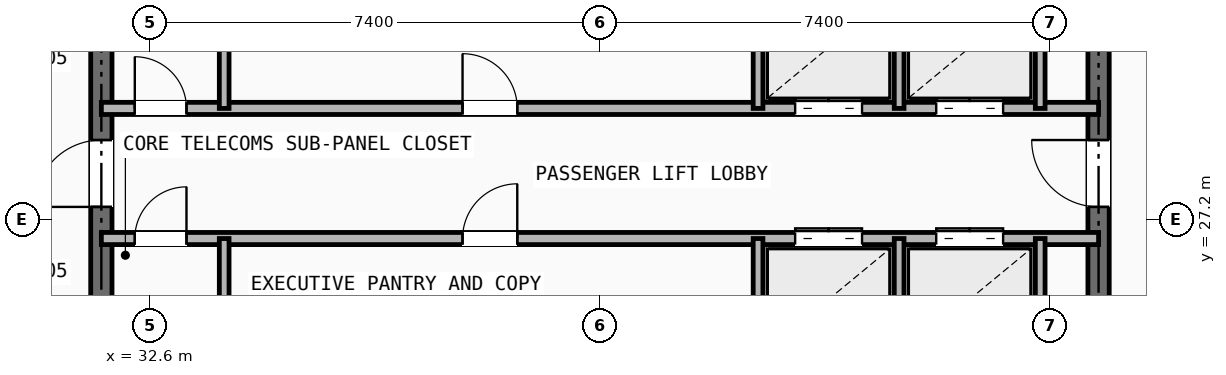
"""IFC4 building model, lengths in metres.
Left out: names, types, materials, properties, quantities, classifications, styles, units other than length and angle.
Written with IfcOpenShell. Run it as: python <this file> out.ifc"""

import sys

from ifc_helpers import new_model, si_unit, direction, frame, frame_2d, origin, place, context, subcontext, project, spatial, rectangle, extrude, element, fill, save


model = new_model("IFC4")
c1 = context("Model", 3, precision=1e-05, world=origin(), true_north=direction((0.0, 1.0)))
c2 = subcontext(c1, "Body", "Model", "MODEL_VIEW")
j1 = project(units=[si_unit("LENGTHUNIT", "METRE"), si_unit("PLANEANGLEUNIT", "RADIAN")], contexts=[c1])
p1 = place(None, origin())
s1 = spatial("IfcSite", under=j1, at=p1, CompositionType="ELEMENT")
p2 = place(p1, origin())
s2 = spatial("IfcBuilding", under=s1, at=p2, CompositionType="ELEMENT")
p3 = place(p2, frame((0.0, 0.0, 262.0)))
s3 = spatial("IfcBuildingStorey", under=s2, at=p3, CompositionType="ELEMENT", Elevation=262.0)
p4 = place(p3, frame((31.8, 16.4, 0.0), z_axis=(0.0, 0.0, 1.0), x_axis=(0.0, 1.0, 0.0)))
e1 = element("IfcWall", 1, at=p4, inside=s3, PredefinedType="SHEAR", context=c2, shape_type="SweptSolid", body=[
    extrude(rectangle(XDim=14.8, YDim=0.35, at=frame_2d((7.4, 0.0))), origin(), (0.0, 0.0, 1.0), 3.25),
])
p5 = place(p4, frame((11.0, 0.0, 0.0)))
e2 = element("IfcOpeningElement", 2, at=p5, cuts=e1, PredefinedType="OPENING", context=c2, shape_type="SweptSolid", body=[
    extrude(rectangle(XDim=1.1, YDim=2.15, at=frame_2d((0.55, 1.075))), frame((0.0, 0.185, 0.0), z_axis=(0.0, -1.0, 0.0), x_axis=(1.0, 0.0, 0.0)), (0.0, 0.0, 1.0), 0.37),
])
p6 = place(p3, frame((48.2, 16.4, 0.0), z_axis=(0.0, 0.0, 1.0), x_axis=(0.0, 1.0, 0.0)))
e3 = element("IfcWall", 3, at=p6, inside=s3, PredefinedType="SHEAR", context=c2, shape_type="SweptSolid", body=[
    extrude(rectangle(XDim=14.8, YDim=0.35, at=frame_2d((7.4, 0.0))), origin(), (0.0, 0.0, 1.0), 3.25),
])
p7 = place(p6, frame((11.0, 0.0, 0.0)))
e4 = element("IfcOpeningElement", 4, at=p7, cuts=e3, PredefinedType="OPENING", context=c2, shape_type="SweptSolid", body=[
    extrude(rectangle(XDim=1.1, YDim=2.15, at=frame_2d((0.55, 1.075))), frame((0.0, 0.185, 0.0), z_axis=(0.0, -1.0, 0.0), x_axis=(1.0, 0.0, 0.0)), (0.0, 0.0, 1.0), 0.37),
])
p8 = place(p3, frame((31.8, 29.02, 0.0), z_axis=(0.0, 0.0, 1.0), x_axis=(1.0, 0.0, 0.0)))
e5 = element("IfcWall", 5, at=p8, inside=s3, PredefinedType="SOLIDWALL", context=c2, shape_type="SweptSolid", body=[
    extrude(rectangle(XDim=16.4, YDim=0.2, at=frame_2d((8.2, 0.0))), origin(), (0.0, 0.0, 1.0), 2.705),
])
p9 = place(p8, frame((0.55, 0.0, 0.0)))
e6 = element("IfcOpeningElement", 6, at=p9, cuts=e5, PredefinedType="OPENING", context=c2, shape_type="SweptSolid", body=[
    extrude(rectangle(XDim=0.85, YDim=2.05, at=frame_2d((0.425, 1.025))), frame((0.0, 0.11, 0.0), z_axis=(0.0, -1.0, 0.0), x_axis=(1.0, 0.0, 0.0)), (0.0, 0.0, 1.0), 0.22),
])
p10 = place(p8, frame((5.94, 0.0, 0.0)))
e7 = element("IfcOpeningElement", 7, at=p10, cuts=e5, PredefinedType="OPENING", context=c2, shape_type="SweptSolid", body=[
    extrude(rectangle(XDim=0.9, YDim=2.1, at=frame_2d((0.45, 1.05))), frame((0.0, 0.11, 0.0), z_axis=(0.0, -1.0, 0.0), x_axis=(1.0, 0.0, 0.0)), (0.0, 0.0, 1.0), 0.22),
])
p11 = place(p8, frame((11.41, 0.0, 0.0)))
e8 = element("IfcOpeningElement", 8, at=p11, cuts=e5, PredefinedType="OPENING", context=c2, shape_type="SweptSolid", body=[
    extrude(rectangle(XDim=1.1, YDim=2.15, at=frame_2d((0.55, 1.075))), frame((0.0, 0.11, 0.0), z_axis=(0.0, -1.0, 0.0), x_axis=(1.0, 0.0, 0.0)), (0.0, 0.0, 1.0), 0.22),
])
p12 = place(p8, frame((13.73, 0.0, 0.0)))
e9 = element("IfcOpeningElement", 9, at=p12, cuts=e5, PredefinedType="OPENING", context=c2, shape_type="SweptSolid", body=[
    extrude(rectangle(XDim=1.1, YDim=2.15, at=frame_2d((0.55, 1.075))), frame((0.0, 0.11, 0.0), z_axis=(0.0, -1.0, 0.0), x_axis=(1.0, 0.0, 0.0)), (0.0, 0.0, 1.0), 0.22),
])
p13 = place(p3, frame((31.8, 26.88, 0.0), z_axis=(0.0, 0.0, 1.0), x_axis=(1.0, 0.0, 0.0)))
e10 = element("IfcWall", 10, at=p13, inside=s3, PredefinedType="SOLIDWALL", context=c2, shape_type="SweptSolid", body=[
    extrude(rectangle(XDim=16.4, YDim=0.2, at=frame_2d((8.2, 0.0))), origin(), (0.0, 0.0, 1.0), 2.705),
])
p14 = place(p13, frame((0.55, 0.0, 0.0)))
e11 = element("IfcOpeningElement", 11, at=p14, cuts=e10, PredefinedType="OPENING", context=c2, shape_type="SweptSolid", body=[
    extrude(rectangle(XDim=0.85, YDim=2.05, at=frame_2d((0.425, 1.025))), frame((0.0, 0.11, 0.0), z_axis=(0.0, -1.0, 0.0), x_axis=(1.0, 0.0, 0.0)), (0.0, 0.0, 1.0), 0.22),
])
p15 = place(p13, frame((5.94, 0.0, 0.0)))
e12 = element("IfcOpeningElement", 12, at=p15, cuts=e10, PredefinedType="OPENING", context=c2, shape_type="SweptSolid", body=[
    extrude(rectangle(XDim=0.9, YDim=2.1, at=frame_2d((0.45, 1.05))), frame((0.0, 0.11, 0.0), z_axis=(0.0, -1.0, 0.0), x_axis=(1.0, 0.0, 0.0)), (0.0, 0.0, 1.0), 0.22),
])
p16 = place(p13, frame((11.41, 0.0, 0.0)))
e13 = element("IfcOpeningElement", 13, at=p16, cuts=e10, PredefinedType="OPENING", context=c2, shape_type="SweptSolid", body=[
    extrude(rectangle(XDim=1.1, YDim=2.15, at=frame_2d((0.55, 1.075))), frame((0.0, 0.11, 0.0), z_axis=(0.0, -1.0, 0.0), x_axis=(1.0, 0.0, 0.0)), (0.0, 0.0, 1.0), 0.22),
])
p17 = place(p13, frame((13.73, 0.0, 0.0)))
e14 = element("IfcOpeningElement", 14, at=p17, cuts=e10, PredefinedType="OPENING", context=c2, shape_type="SweptSolid", body=[
    extrude(rectangle(XDim=1.1, YDim=2.15, at=frame_2d((0.55, 1.075))), frame((0.0, 0.11, 0.0), z_axis=(0.0, -1.0, 0.0), x_axis=(1.0, 0.0, 0.0)), (0.0, 0.0, 1.0), 0.22),
])
p18 = place(p3, frame((33.82, 29.02, 0.0), z_axis=(0.0, 0.0, 1.0), x_axis=(0.0, 1.0, 0.0)))
e15 = element("IfcWall", 15, at=p18, inside=s3, PredefinedType="SOLIDWALL", context=c2, shape_type="SweptSolid", body=[
    extrude(rectangle(XDim=2.18, YDim=0.16, at=frame_2d((1.09, 0.0))), origin(), (0.0, 0.0, 1.0), 2.705),
])
p19 = place(p3, frame((33.82, 24.8, 0.0), z_axis=(0.0, 0.0, 1.0), x_axis=(0.0, 1.0, 0.0)))
e16 = element("IfcWall", 16, at=p19, inside=s3, PredefinedType="SOLIDWALL", context=c2, shape_type="SweptSolid", body=[
    extrude(rectangle(XDim=2.08, YDim=0.16, at=frame_2d((1.04, 0.0))), origin(), (0.0, 0.0, 1.0), 3.25),
])
for number, where, z_axis, x_axis in (
    (17, (42.6, 29.02, 0.0), (0.0, 0.0, 1.0), (0.0, 1.0, 0.0)),
    (18, (44.92, 29.02, 0.0), (0.0, 0.0, 1.0), (0.0, 1.0, 0.0)),
    (19, (47.24, 29.02, 0.0), (0.0, 0.0, 1.0), (0.0, 1.0, 0.0)),
):
    element("IfcWall", number, at=place(p3, frame(where, z_axis=z_axis, x_axis=x_axis)), inside=s3, PredefinedType="SOLIDWALL", context=c2, shape_type="SweptSolid", body=[
        extrude(rectangle(XDim=2.18, YDim=0.16, at=frame_2d((1.09, 0.0))), origin(), (0.0, 0.0, 1.0), 2.705),
    ])
for number, where, z_axis, x_axis in (
    (20, (42.6, 24.8, 0.0), (0.0, 0.0, 1.0), (0.0, 1.0, 0.0)),
    (21, (44.92, 24.8, 0.0), (0.0, 0.0, 1.0), (0.0, 1.0, 0.0)),
    (22, (47.24, 24.8, 0.0), (0.0, 0.0, 1.0), (0.0, 1.0, 0.0)),
):
    element("IfcWall", number, at=place(p3, frame(where, z_axis=z_axis, x_axis=x_axis)), inside=s3, PredefinedType="SOLIDWALL", context=c2, shape_type="SweptSolid", body=[
        extrude(rectangle(XDim=2.08, YDim=0.16, at=frame_2d((1.04, 0.0))), origin(), (0.0, 0.0, 1.0), 3.25),
    ])
p20 = place(p9, origin())
e23 = element("IfcDoor", 23, at=p20, inside=s3, OperationType="SINGLE_SWING_LEFT", PredefinedType="DOOR", context=c2, shape_type="SweptSolid", body=[
    extrude(rectangle(XDim=0.85, YDim=2.05, at=frame_2d((0.425, 1.025))), frame((0.0, 0.025, 0.0), z_axis=(0.0, -1.0, 0.0), x_axis=(1.0, 0.0, 0.0)), (0.0, 0.0, 1.0), 0.05),
])
fill(e6, e23)
p21 = place(p14, origin())
e24 = element("IfcDoor", 24, at=p21, inside=s3, OperationType="SINGLE_SWING_RIGHT", PredefinedType="DOOR", context=c2, shape_type="SweptSolid", body=[
    extrude(rectangle(XDim=0.85, YDim=2.05, at=frame_2d((0.425, 1.025))), frame((0.0, 0.025, 0.0), z_axis=(0.0, -1.0, 0.0), x_axis=(1.0, 0.0, 0.0)), (0.0, 0.0, 1.0), 0.05),
])
fill(e11, e24)
p22 = place(p5, origin())
e25 = element("IfcDoor", 25, at=p22, inside=s3, OperationType="SINGLE_SWING_LEFT", PredefinedType="DOOR", context=c2, shape_type="SweptSolid", body=[
    extrude(rectangle(XDim=1.1, YDim=2.15, at=frame_2d((0.55, 1.075))), frame((0.0, 0.025, 0.0), z_axis=(0.0, -1.0, 0.0), x_axis=(1.0, 0.0, 0.0)), (0.0, 0.0, 1.0), 0.05),
])
fill(e2, e25)
p23 = place(p7, origin())
e26 = element("IfcDoor", 26, at=p23, inside=s3, OperationType="SINGLE_SWING_RIGHT", PredefinedType="DOOR", context=c2, shape_type="SweptSolid", body=[
    extrude(rectangle(XDim=1.1, YDim=2.15, at=frame_2d((0.55, 1.075))), frame((0.0, 0.025, 0.0), z_axis=(0.0, -1.0, 0.0), x_axis=(1.0, 0.0, 0.0)), (0.0, 0.0, 1.0), 0.05),
])
fill(e4, e26)
p24 = place(p10, origin())
e27 = element("IfcDoor", 27, at=p24, inside=s3, OperationType="SINGLE_SWING_LEFT", PredefinedType="DOOR", context=c2, shape_type="SweptSolid", body=[
    extrude(rectangle(XDim=0.9, YDim=2.1, at=frame_2d((0.45, 1.05))), frame((0.0, 0.025, 0.0), z_axis=(0.0, -1.0, 0.0), x_axis=(1.0, 0.0, 0.0)), (0.0, 0.0, 1.0), 0.05),
])
fill(e7, e27)
p25 = place(p15, origin())
e28 = element("IfcDoor", 28, at=p25, inside=s3, OperationType="SINGLE_SWING_RIGHT", PredefinedType="DOOR", context=c2, shape_type="SweptSolid", body=[
    extrude(rectangle(XDim=0.9, YDim=2.1, at=frame_2d((0.45, 1.05))), frame((0.0, 0.025, 0.0), z_axis=(0.0, -1.0, 0.0), x_axis=(1.0, 0.0, 0.0)), (0.0, 0.0, 1.0), 0.05),
])
fill(e12, e28)
p26 = place(p11, origin())
e29 = element("IfcDoor", 29, at=p26, inside=s3, OperationType="DOUBLE_DOOR_SLIDING", PredefinedType="DOOR", context=c2, shape_type="SweptSolid", body=[
    extrude(rectangle(XDim=1.1, YDim=2.15, at=frame_2d((0.55, 1.075))), frame((0.0, 0.025, 0.0), z_axis=(0.0, -1.0, 0.0), x_axis=(1.0, 0.0, 0.0)), (0.0, 0.0, 1.0), 0.05),
])
fill(e8, e29)
p27 = place(p12, origin())
e30 = element("IfcDoor", 30, at=p27, inside=s3, OperationType="DOUBLE_DOOR_SLIDING", PredefinedType="DOOR", context=c2, shape_type="SweptSolid", body=[
    extrude(rectangle(XDim=1.1, YDim=2.15, at=frame_2d((0.55, 1.075))), frame((0.0, 0.025, 0.0), z_axis=(0.0, -1.0, 0.0), x_axis=(1.0, 0.0, 0.0)), (0.0, 0.0, 1.0), 0.05),
])
fill(e9, e30)
p28 = place(p16, origin())
e31 = element("IfcDoor", 31, at=p28, inside=s3, OperationType="DOUBLE_DOOR_SLIDING", PredefinedType="DOOR", context=c2, shape_type="SweptSolid", body=[
    extrude(rectangle(XDim=1.1, YDim=2.15, at=frame_2d((0.55, 1.075))), frame((0.0, 0.025, 0.0), z_axis=(0.0, -1.0, 0.0), x_axis=(1.0, 0.0, 0.0)), (0.0, 0.0, 1.0), 0.05),
])
fill(e13, e31)
p29 = place(p17, origin())
e32 = element("IfcDoor", 32, at=p29, inside=s3, OperationType="DOUBLE_DOOR_SLIDING", PredefinedType="DOOR", context=c2, shape_type="SweptSolid", body=[
    extrude(rectangle(XDim=1.1, YDim=2.15, at=frame_2d((0.55, 1.075))), frame((0.0, 0.025, 0.0), z_axis=(0.0, -1.0, 0.0), x_axis=(1.0, 0.0, 0.0)), (0.0, 0.0, 1.0), 0.05),
])
fill(e14, e32)
save(model, sys.argv[1])
